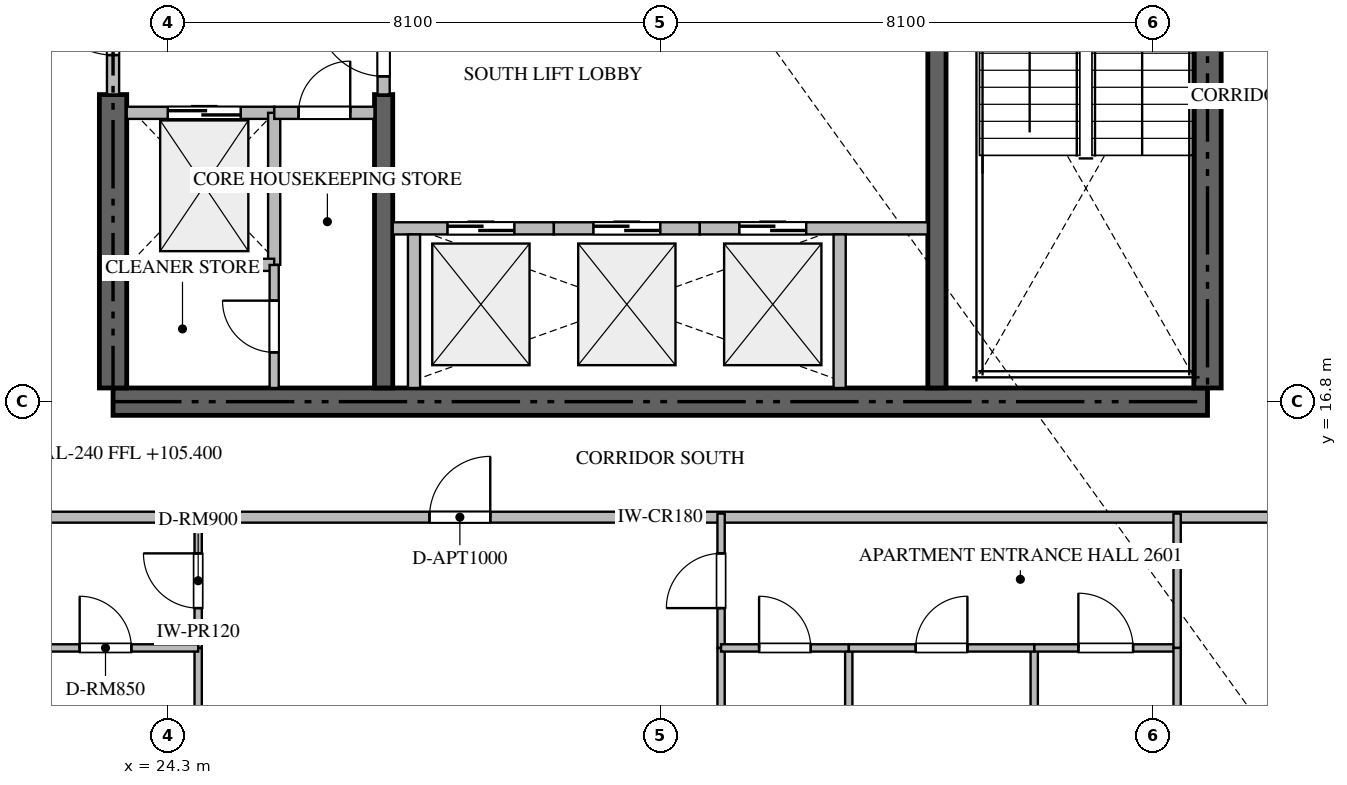
"""IFC4 building model, lengths in metres.
Left out: names, types, materials, properties, quantities, classifications, styles, units other than length and angle.
Written with IfcOpenShell. Run it as: python <this file> out.ifc"""

import sys

from ifc_helpers import new_model, si_unit, direction, frame, frame_2d, origin, place, context, subcontext, project, spatial, rectangle, extrude, source, transform, mapped, element, fill, save


model = new_model("IFC4")
c1 = context("Model", 3, precision=1e-05, world=origin(), true_north=direction((0.0, 1.0)))
c2 = subcontext(c1, "Body", "Model", "MODEL_VIEW")
j1 = project(units=[si_unit("LENGTHUNIT", "METRE"), si_unit("PLANEANGLEUNIT", "RADIAN")], contexts=[c1])
p1 = place(None, origin())
s1 = spatial("IfcSite", under=j1, at=p1, CompositionType="ELEMENT")
p2 = place(p1, origin())
s2 = spatial("IfcBuilding", under=s1, at=p2, CompositionType="ELEMENT")
p3 = place(p2, frame((0.0, 0.0, 105.45)))
s3 = spatial("IfcBuildingStorey", under=s2, at=p3, CompositionType="ELEMENT", Elevation=105.45)
p4 = place(p3, frame((23.4, 16.8, -0.26), z_axis=(0.0, 0.0, 1.0), x_axis=(1.0, 0.0, 0.0)))
e1 = element("IfcWall", 1, at=p4, inside=s3, PredefinedType="SHEAR", context=c2, shape_type="SweptSolid", body=[
    extrude(rectangle(XDim=18.0, YDim=0.45, at=frame_2d((9.0, 0.0))), origin(), (0.0, 0.0, 1.0), 3.648),
])
p5 = place(p3, frame((23.4, 17.025, -0.26), z_axis=(0.0, 0.0, 1.0), x_axis=(0.0, 1.0, 0.0)))
e2 = element("IfcWall", 2, at=p5, inside=s3, PredefinedType="SHEAR", context=c2, shape_type="SweptSolid", body=[
    extrude(rectangle(XDim=4.825, YDim=0.45, at=frame_2d((2.413, 0.0))), origin(), (0.0, 0.0, 1.0), 3.648),
])
p6 = place(p3, frame((41.4, 17.025, -0.26), z_axis=(0.0, 0.0, 1.0), x_axis=(0.0, 1.0, 0.0)))
e3 = element("IfcWall", 3, at=p6, inside=s3, PredefinedType="SHEAR", context=c2, shape_type="SweptSolid", body=[
    extrude(rectangle(XDim=8.325, YDim=0.45, at=frame_2d((4.163, 0.0))), origin(), (0.0, 0.0, 1.0), 3.648),
])
p7 = place(p3, frame((27.85, 17.025, -0.26), z_axis=(0.0, 0.0, 1.0), x_axis=(0.0, 1.0, 0.0)))
e4 = element("IfcWall", 4, at=p7, inside=s3, PredefinedType="SHEAR", context=c2, shape_type="SweptSolid", body=[
    extrude(rectangle(XDim=4.825, YDim=0.3, at=frame_2d((2.413, 0.0))), origin(), (0.0, 0.0, 1.0), 3.648),
])
p8 = place(p3, frame((36.95, 17.025, -0.26), z_axis=(0.0, 0.0, 1.0), x_axis=(0.0, 1.0, 0.0)))
e5 = element("IfcWall", 5, at=p8, inside=s3, PredefinedType="SHEAR", context=c2, shape_type="SweptSolid", body=[
    extrude(rectangle(XDim=8.325, YDim=0.3, at=frame_2d((4.163, 0.0))), origin(), (0.0, 0.0, 1.0), 3.648),
])
p9 = place(p3, frame((23.625, 21.55, 0.0), z_axis=(0.0, 0.0, 1.0), x_axis=(1.0, 0.0, 0.0)))
e6 = element("IfcWall", 6, at=p9, inside=s3, PredefinedType="STANDARD", context=c2, shape_type="SweptSolid", body=[
    extrude(rectangle(XDim=2.425, YDim=0.2, at=frame_2d((1.212, 0.0))), origin(), (0.0, 0.0, 1.0), 3.39),
])
p10 = place(p9, frame((0.675, 0.0, 0.0)))
e7 = element("IfcOpeningElement", 7, at=p10, cuts=e6, PredefinedType="OPENING", context=c2, shape_type="SweptSolid", body=[
    extrude(rectangle(XDim=1.2, YDim=2.2, at=frame_2d((0.6, 1.1))), frame((0.0, 0.11, 0.0), z_axis=(0.0, -1.0, 0.0), x_axis=(1.0, 0.0, 0.0)), (0.0, 0.0, 1.0), 0.22),
])
p11 = place(p3, frame((28.0, 19.65, 0.0), z_axis=(0.0, 0.0, 1.0), x_axis=(1.0, 0.0, 0.0)))
e8 = element("IfcWall", 8, at=p11, inside=s3, PredefinedType="STANDARD", context=c2, shape_type="SweptSolid", body=[
    extrude(rectangle(XDim=2.65, YDim=0.2, at=frame_2d((1.325, 0.0))), origin(), (0.0, 0.0, 1.0), 3.39),
])
p12 = place(p11, frame((0.9, 0.0, 0.0)))
e9 = element("IfcOpeningElement", 9, at=p12, cuts=e8, PredefinedType="OPENING", context=c2, shape_type="SweptSolid", body=[
    extrude(rectangle(XDim=1.1, YDim=2.2, at=frame_2d((0.55, 1.1))), frame((0.0, 0.11, 0.0), z_axis=(0.0, -1.0, 0.0), x_axis=(1.0, 0.0, 0.0)), (0.0, 0.0, 1.0), 0.22),
])
p13 = place(p3, frame((28.35, 17.025, 0.0), z_axis=(0.0, 0.0, 1.0), x_axis=(0.0, 1.0, 0.0)))
e10 = element("IfcWall", 10, at=p13, inside=s3, PredefinedType="STANDARD", context=c2, shape_type="SweptSolid", body=[
    extrude(rectangle(XDim=2.525, YDim=0.2, at=frame_2d((1.263, 0.0))), origin(), (0.0, 0.0, 1.0), 3.39),
])
p14 = place(p3, frame((30.65, 19.65, 0.0), z_axis=(0.0, 0.0, 1.0), x_axis=(1.0, 0.0, 0.0)))
e11 = element("IfcWall", 11, at=p14, inside=s3, PredefinedType="STANDARD", context=c2, shape_type="SweptSolid", body=[
    extrude(rectangle(XDim=2.4, YDim=0.2, at=frame_2d((1.2, 0.0))), origin(), (0.0, 0.0, 1.0), 3.39),
])
p15 = place(p14, frame((0.65, 0.0, 0.0)))
e12 = element("IfcOpeningElement", 12, at=p15, cuts=e11, PredefinedType="OPENING", context=c2, shape_type="SweptSolid", body=[
    extrude(rectangle(XDim=1.1, YDim=2.2, at=frame_2d((0.55, 1.1))), frame((0.0, 0.11, 0.0), z_axis=(0.0, -1.0, 0.0), x_axis=(1.0, 0.0, 0.0)), (0.0, 0.0, 1.0), 0.22),
])
p16 = place(p3, frame((33.05, 19.65, 0.0), z_axis=(0.0, 0.0, 1.0), x_axis=(1.0, 0.0, 0.0)))
e13 = element("IfcWall", 13, at=p16, inside=s3, PredefinedType="STANDARD", context=c2, shape_type="SweptSolid", body=[
    extrude(rectangle(XDim=3.75, YDim=0.2, at=frame_2d((1.875, 0.0))), origin(), (0.0, 0.0, 1.0), 3.39),
])
p17 = place(p16, frame((0.65, 0.0, 0.0)))
e14 = element("IfcOpeningElement", 14, at=p17, cuts=e13, PredefinedType="OPENING", context=c2, shape_type="SweptSolid", body=[
    extrude(rectangle(XDim=1.1, YDim=2.2, at=frame_2d((0.55, 1.1))), frame((0.0, 0.11, 0.0), z_axis=(0.0, -1.0, 0.0), x_axis=(1.0, 0.0, 0.0)), (0.0, 0.0, 1.0), 0.22),
])
p18 = place(p3, frame((35.35, 17.025, 0.0), z_axis=(0.0, 0.0, 1.0), x_axis=(0.0, 1.0, 0.0)))
e15 = element("IfcWall", 15, at=p18, inside=s3, PredefinedType="STANDARD", context=c2, shape_type="SweptSolid", body=[
    extrude(rectangle(XDim=2.525, YDim=0.2, at=frame_2d((1.263, 0.0))), origin(), (0.0, 0.0, 1.0), 3.39),
])
p19 = place(p3, frame((26.05, 19.05, 0.0), z_axis=(0.0, 0.0, 1.0), x_axis=(0.0, 1.0, 0.0)))
e16 = element("IfcWall", 16, at=p19, inside=s3, PredefinedType="STANDARD", context=c2, shape_type="SweptSolid", body=[
    extrude(rectangle(XDim=2.5, YDim=0.2, at=frame_2d((1.25, 0.0))), origin(), (0.0, 0.0, 1.0), 3.39),
])
p20 = place(p3, frame((23.625, 19.05, 0.0), z_axis=(0.0, 0.0, 1.0), x_axis=(1.0, 0.0, 0.0)))
e17 = element("IfcWall", 17, at=p20, inside=s3, PredefinedType="STANDARD", context=c2, shape_type="SweptSolid", body=[
    extrude(rectangle(XDim=2.425, YDim=0.2, at=frame_2d((1.212, 0.0))), origin(), (0.0, 0.0, 1.0), 3.39),
])
p21 = place(p3, frame((26.052, 21.55, 0.0), z_axis=(0.0, 0.0, 1.0), x_axis=(1.0, 0.0, 0.0)))
e18 = element("IfcWall", 18, at=p21, inside=s3, PredefinedType="STANDARD", context=c2, shape_type="SweptSolid", body=[
    extrude(rectangle(XDim=1.648, YDim=0.2, at=frame_2d((0.824, 0.0))), origin(), (0.0, 0.0, 1.0), 3.39),
])
p22 = place(p21, frame((0.399, 0.0, 0.0)))
e19 = element("IfcOpeningElement", 19, at=p22, cuts=e18, PredefinedType="OPENING", context=c2, shape_type="SweptSolid", body=[
    extrude(rectangle(XDim=0.85, YDim=2.1, at=frame_2d((0.425, 1.05))), frame((0.0, 0.11, 0.0), z_axis=(0.0, -1.0, 0.0), x_axis=(1.0, 0.0, 0.0)), (0.0, 0.0, 1.0), 0.22),
])
p23 = place(p3, frame((23.4, 21.852, 0.0), z_axis=(0.0, 0.0, 1.0), x_axis=(0.0, 1.0, 0.0)))
e20 = element("IfcWall", 20, at=p23, inside=s3, PredefinedType="STANDARD", context=c2, shape_type="SweptSolid", body=[
    extrude(rectangle(XDim=2.396, YDim=0.2, at=frame_2d((1.198, 0.0))), origin(), (0.0, 0.0, 1.0), 3.39),
])
p24 = place(p23, frame((0.648, 0.0, 0.0)))
e21 = element("IfcOpeningElement", 21, at=p24, cuts=e20, PredefinedType="OPENING", context=c2, shape_type="SweptSolid", body=[
    extrude(rectangle(XDim=1.1, YDim=2.15, at=frame_2d((0.55, 1.075))), frame((0.0, 0.11, 0.0), z_axis=(0.0, -1.0, 0.0), x_axis=(1.0, 0.0, 0.0)), (0.0, 0.0, 1.0), 0.22),
])
p25 = place(p3, frame((27.85, 21.852, 0.0), z_axis=(0.0, 0.0, 1.0), x_axis=(0.0, 1.0, 0.0)))
e22 = element("IfcWall", 22, at=p25, inside=s3, PredefinedType="STANDARD", context=c2, shape_type="SweptSolid", body=[
    extrude(rectangle(XDim=1.696, YDim=0.2, at=frame_2d((0.848, 0.0))), origin(), (0.0, 0.0, 1.0), 3.39),
])
p26 = place(p25, frame((0.298, 0.0, 0.0)))
e23 = element("IfcOpeningElement", 23, at=p26, cuts=e22, PredefinedType="OPENING", context=c2, shape_type="SweptSolid", body=[
    extrude(rectangle(XDim=1.1, YDim=2.15, at=frame_2d((0.55, 1.075))), frame((0.0, 0.11, 0.0), z_axis=(0.0, -1.0, 0.0), x_axis=(1.0, 0.0, 0.0)), (0.0, 0.0, 1.0), 0.22),
])
p27 = place(p3, frame((26.05, 17.025, 0.0), z_axis=(0.0, 0.0, 1.0), x_axis=(0.0, 1.0, 0.0)))
e24 = element("IfcWall", 24, at=p27, inside=s3, PredefinedType="PARTITIONING", context=c2, shape_type="SweptSolid", body=[
    extrude(rectangle(XDim=2.023, YDim=0.15, at=frame_2d((1.012, 0.0))), origin(), (0.0, 0.0, 1.0), 3.39),
])
p28 = place(p27, frame((0.586, 0.0, 0.0)))
e25 = element("IfcOpeningElement", 25, at=p28, cuts=e24, PredefinedType="OPENING", context=c2, shape_type="SweptSolid", body=[
    extrude(rectangle(XDim=0.85, YDim=2.1, at=frame_2d((0.425, 1.05))), frame((0.0, 0.085, 0.0), z_axis=(0.0, -1.0, 0.0), x_axis=(1.0, 0.0, 0.0)), (0.0, 0.0, 1.0), 0.17),
])
p29 = place(p3, frame((21.402, 14.9, 0.0), z_axis=(0.0, 0.0, 1.0), x_axis=(1.0, 0.0, 0.0)))
e26 = element("IfcWall", 26, at=p29, inside=s3, PredefinedType="PARTITIONING", context=c2, shape_type="SweptSolid", body=[
    extrude(rectangle(XDim=21.996, YDim=0.18, at=frame_2d((10.998, 0.0))), origin(), (0.0, 0.0, 1.0), 3.39),
])
p30 = place(p29, frame((7.202, 0.0, 0.0)))
e27 = element("IfcOpeningElement", 27, at=p30, cuts=e26, PredefinedType="OPENING", context=c2, shape_type="SweptSolid", body=[
    extrude(rectangle(XDim=1.0, YDim=2.15, at=frame_2d((0.5, 1.075))), frame((0.0, 0.1, 0.0), z_axis=(0.0, -1.0, 0.0), x_axis=(1.0, 0.0, 0.0)), (0.0, 0.0, 1.0), 0.2),
])
p31 = place(p3, frame((24.8, 12.75, 0.0), z_axis=(0.0, 0.0, 1.0), x_axis=(0.0, 1.0, 0.0)))
e28 = element("IfcWall", 28, at=p31, inside=s3, PredefinedType="PARTITIONING", context=c2, shape_type="SweptSolid", body=[
    extrude(rectangle(XDim=2.21, YDim=0.12, at=frame_2d((1.105, 0.0))), origin(), (0.0, 0.0, 1.0), 3.39),
])
p32 = place(p31, frame((0.655, 0.0, 0.0)))
e29 = element("IfcOpeningElement", 29, at=p32, cuts=e28, PredefinedType="OPENING", context=c2, shape_type="SweptSolid", body=[
    extrude(rectangle(XDim=0.9, YDim=2.1, at=frame_2d((0.45, 1.05))), frame((0.0, 0.07, 0.0), z_axis=(0.0, -1.0, 0.0), x_axis=(1.0, 0.0, 0.0)), (0.0, 0.0, 1.0), 0.14),
])
p33 = place(p3, frame((24.8, 6.862, 0.0), z_axis=(0.0, 0.0, 1.0), x_axis=(0.0, 1.0, 0.0)))
e30 = element("IfcWall", 30, at=p33, inside=s3, PredefinedType="PARTITIONING", context=c2, shape_type="SweptSolid", body=[
    extrude(rectangle(XDim=5.886, YDim=0.12, at=frame_2d((2.943, 0.0))), origin(), (0.0, 0.0, 1.0), 3.39),
])
p34 = place(p3, frame((21.752, 12.75, 0.0), z_axis=(0.0, 0.0, 1.0), x_axis=(1.0, 0.0, 0.0)))
e31 = element("IfcWall", 31, at=p34, inside=s3, PredefinedType="PARTITIONING", context=c2, shape_type="SweptSolid", body=[
    extrude(rectangle(XDim=3.048, YDim=0.12, at=frame_2d((1.524, 0.0))), origin(), (0.0, 0.0, 1.0), 3.39),
])
p35 = place(p34, frame((1.099, 0.0, 0.0)))
e32 = element("IfcOpeningElement", 32, at=p35, cuts=e31, PredefinedType="OPENING", context=c2, shape_type="SweptSolid", body=[
    extrude(rectangle(XDim=0.85, YDim=2.1, at=frame_2d((0.425, 1.05))), frame((0.0, 0.07, 0.0), z_axis=(0.0, -1.0, 0.0), x_axis=(1.0, 0.0, 0.0)), (0.0, 0.0, 1.0), 0.14),
])
p36 = place(p3, frame((33.4, 12.75, 0.0), z_axis=(0.0, 0.0, 1.0), x_axis=(0.0, 1.0, 0.0)))
e33 = element("IfcWall", 33, at=p36, inside=s3, PredefinedType="PARTITIONING", context=c2, shape_type="SweptSolid", body=[
    extrude(rectangle(XDim=2.21, YDim=0.12, at=frame_2d((1.105, 0.0))), origin(), (0.0, 0.0, 1.0), 3.39),
])
p37 = place(p36, frame((0.655, 0.0, 0.0)))
e34 = element("IfcOpeningElement", 34, at=p37, cuts=e33, PredefinedType="OPENING", context=c2, shape_type="SweptSolid", body=[
    extrude(rectangle(XDim=0.9, YDim=2.1, at=frame_2d((0.45, 1.05))), frame((0.0, 0.07, 0.0), z_axis=(0.0, -1.0, 0.0), x_axis=(1.0, 0.0, 0.0)), (0.0, 0.0, 1.0), 0.14),
])
p38 = place(p3, frame((33.4, 6.862, 0.0), z_axis=(0.0, 0.0, 1.0), x_axis=(0.0, 1.0, 0.0)))
e35 = element("IfcWall", 35, at=p38, inside=s3, PredefinedType="PARTITIONING", context=c2, shape_type="SweptSolid", body=[
    extrude(rectangle(XDim=5.886, YDim=0.12, at=frame_2d((2.943, 0.0))), origin(), (0.0, 0.0, 1.0), 3.39),
])
p39 = place(p3, frame((38.55, 0.295, 0.0), z_axis=(0.0, 0.0, 1.0), x_axis=(0.0, 1.0, 0.0)))
e36 = element("IfcWall", 36, at=p39, inside=s3, PredefinedType="PARTITIONING", context=c2, shape_type="SweptSolid", body=[
    extrude(rectangle(XDim=12.455, YDim=0.12, at=frame_2d((6.228, 0.0))), origin(), (0.0, 0.0, 1.0), 3.39),
])
p40 = place(p3, frame((35.5, 6.86, 0.0), z_axis=(0.0, 0.0, 1.0), x_axis=(0.0, 1.0, 0.0)))
e37 = element("IfcWall", 37, at=p40, inside=s3, PredefinedType="PARTITIONING", context=c2, shape_type="SweptSolid", body=[
    extrude(rectangle(XDim=5.89, YDim=0.12, at=frame_2d((2.945, 0.0))), origin(), (0.0, 0.0, 1.0), 3.39),
])
p41 = place(p3, frame((33.4, 12.75, 0.0), z_axis=(0.0, 0.0, 1.0), x_axis=(1.0, 0.0, 0.0)))
e38 = element("IfcWall", 38, at=p41, inside=s3, PredefinedType="PARTITIONING", context=c2, shape_type="SweptSolid", body=[
    extrude(rectangle(XDim=2.1, YDim=0.12, at=frame_2d((1.05, 0.0))), origin(), (0.0, 0.0, 1.0), 3.39),
])
p42 = place(p41, frame((0.625, 0.0, 0.0)))
e39 = element("IfcOpeningElement", 39, at=p42, cuts=e38, PredefinedType="OPENING", context=c2, shape_type="SweptSolid", body=[
    extrude(rectangle(XDim=0.85, YDim=2.1, at=frame_2d((0.425, 1.05))), frame((0.0, 0.07, 0.0), z_axis=(0.0, -1.0, 0.0), x_axis=(1.0, 0.0, 0.0)), (0.0, 0.0, 1.0), 0.14),
])
p43 = place(p3, frame((35.502, 12.75, 0.0), z_axis=(0.0, 0.0, 1.0), x_axis=(1.0, 0.0, 0.0)))
e40 = element("IfcWall", 40, at=p43, inside=s3, PredefinedType="PARTITIONING", context=c2, shape_type="SweptSolid", body=[
    extrude(rectangle(XDim=3.048, YDim=0.12, at=frame_2d((1.524, 0.0))), origin(), (0.0, 0.0, 1.0), 3.39),
])
p44 = place(p43, frame((1.099, 0.0, 0.0)))
e41 = element("IfcOpeningElement", 41, at=p44, cuts=e40, PredefinedType="OPENING", context=c2, shape_type="SweptSolid", body=[
    extrude(rectangle(XDim=0.85, YDim=2.1, at=frame_2d((0.425, 1.05))), frame((0.0, 0.07, 0.0), z_axis=(0.0, -1.0, 0.0), x_axis=(1.0, 0.0, 0.0)), (0.0, 0.0, 1.0), 0.14),
])
p45 = place(p3, frame((38.552, 12.75, 0.0), z_axis=(0.0, 0.0, 1.0), x_axis=(1.0, 0.0, 0.0)))
e42 = element("IfcWall", 42, at=p45, inside=s3, PredefinedType="PARTITIONING", context=c2, shape_type="SweptSolid", body=[
    extrude(rectangle(XDim=2.348, YDim=0.12, at=frame_2d((1.174, 0.0))), origin(), (0.0, 0.0, 1.0), 3.39),
])
p46 = place(p45, frame((0.724, 0.0, 0.0)))
e43 = element("IfcOpeningElement", 43, at=p46, cuts=e42, PredefinedType="OPENING", context=c2, shape_type="SweptSolid", body=[
    extrude(rectangle(XDim=0.9, YDim=2.1, at=frame_2d((0.45, 1.05))), frame((0.0, 0.07, 0.0), z_axis=(0.0, -1.0, 0.0), x_axis=(1.0, 0.0, 0.0)), (0.0, 0.0, 1.0), 0.14),
])
p47 = place(p3, frame((40.9, 9.095, 0.0), z_axis=(0.0, 0.0, 1.0), x_axis=(0.0, 1.0, 0.0)))
e44 = element("IfcWall", 44, at=p47, inside=s3, PredefinedType="PARTITIONING", context=c2, shape_type="SweptSolid", body=[
    extrude(rectangle(XDim=3.655, YDim=0.12, at=frame_2d((1.828, 0.0))), origin(), (0.0, 0.0, 1.0), 3.39),
])
p48 = place(p47, frame((1.402, 0.0, 0.0)))
e45 = element("IfcOpeningElement", 45, at=p48, cuts=e44, PredefinedType="OPENING", context=c2, shape_type="SweptSolid", body=[
    extrude(rectangle(XDim=0.85, YDim=2.1, at=frame_2d((0.425, 1.05))), frame((0.0, 0.07, 0.0), z_axis=(0.0, -1.0, 0.0), x_axis=(1.0, 0.0, 0.0)), (0.0, 0.0, 1.0), 0.14),
])
p49 = place(p3, frame((40.9, 12.752, 0.0), z_axis=(0.0, 0.0, 1.0), x_axis=(0.0, 1.0, 0.0)))
e46 = element("IfcWall", 46, at=p49, inside=s3, PredefinedType="PARTITIONING", context=c2, shape_type="SweptSolid", body=[
    extrude(rectangle(XDim=2.208, YDim=0.12, at=frame_2d((1.104, 0.0))), origin(), (0.0, 0.0, 1.0), 3.39),
])
m1 = source(origin(), c2, "Body", "SweptSolid", [
    extrude(rectangle(XDim=1.2, YDim=2.2, at=frame_2d((0.6, 1.1))), frame((0.0, 0.025, 0.0), z_axis=(0.0, -1.0, 0.0), x_axis=(1.0, 0.0, 0.0)), (0.0, 0.0, 1.0), 0.05),
])
p50 = place(p10, origin())
e47 = element("IfcDoor", 47, at=p50, inside=s3, OperationType="DOUBLE_DOOR_SLIDING", PredefinedType="DOOR", context=c2, shape_type="MappedRepresentation", body=[
    mapped(m1, transform((0.0, 0.0, 0.0), scale=1.0)),
])
fill(e7, e47)
m2 = source(origin(), c2, "Body", "SweptSolid", [
    extrude(rectangle(XDim=1.1, YDim=2.2, at=frame_2d((0.55, 1.1))), frame((0.0, 0.025, 0.0), z_axis=(0.0, -1.0, 0.0), x_axis=(1.0, 0.0, 0.0)), (0.0, 0.0, 1.0), 0.05),
])
p51 = place(p12, origin())
e48 = element("IfcDoor", 48, at=p51, inside=s3, OperationType="DOUBLE_DOOR_SLIDING", PredefinedType="DOOR", context=c2, shape_type="MappedRepresentation", body=[
    mapped(m2, transform((0.0, 0.0, 0.0), scale=1.0)),
])
fill(e9, e48)
p52 = place(p15, origin())
e49 = element("IfcDoor", 49, at=p52, inside=s3, OperationType="DOUBLE_DOOR_SLIDING", PredefinedType="DOOR", context=c2, shape_type="MappedRepresentation", body=[
    mapped(m2, transform((0.0, 0.0, 0.0), scale=1.0)),
])
fill(e12, e49)
p53 = place(p17, origin())
e50 = element("IfcDoor", 50, at=p53, inside=s3, OperationType="DOUBLE_DOOR_SLIDING", PredefinedType="DOOR", context=c2, shape_type="MappedRepresentation", body=[
    mapped(m2, transform((0.0, 0.0, 0.0), scale=1.0)),
])
fill(e14, e50)
m3 = source(origin(), c2, "Body", "SweptSolid", [
    extrude(rectangle(XDim=0.85, YDim=2.1, at=frame_2d((0.425, 1.05))), frame((0.0, 0.025, 0.0), z_axis=(0.0, -1.0, 0.0), x_axis=(1.0, 0.0, 0.0)), (0.0, 0.0, 1.0), 0.05),
])
p54 = place(p22, origin())
e51 = element("IfcDoor", 51, at=p54, inside=s3, OperationType="SINGLE_SWING_RIGHT", PredefinedType="DOOR", context=c2, shape_type="MappedRepresentation", body=[
    mapped(m3, transform((0.0, 0.0, 0.0), scale=1.0)),
])
fill(e19, e51)
m4 = source(origin(), c2, "Body", "SweptSolid", [
    extrude(rectangle(XDim=1.1, YDim=2.15, at=frame_2d((0.55, 1.075))), frame((0.0, 0.025, 0.0), z_axis=(0.0, -1.0, 0.0), x_axis=(1.0, 0.0, 0.0)), (0.0, 0.0, 1.0), 0.05),
])
p55 = place(p24, origin())
e52 = element("IfcDoor", 52, at=p55, inside=s3, OperationType="SINGLE_SWING_RIGHT", PredefinedType="DOOR", context=c2, shape_type="MappedRepresentation", body=[
    mapped(m4, transform((0.0, 0.0, 0.0), scale=1.0)),
])
fill(e21, e52)
p56 = place(p26, origin())
e53 = element("IfcDoor", 53, at=p56, inside=s3, OperationType="SINGLE_SWING_RIGHT", PredefinedType="DOOR", context=c2, shape_type="MappedRepresentation", body=[
    mapped(m4, transform((0.0, 0.0, 0.0), scale=1.0)),
])
fill(e23, e53)
p57 = place(p28, origin())
e54 = element("IfcDoor", 54, at=p57, inside=s3, OperationType="SINGLE_SWING_RIGHT", PredefinedType="DOOR", context=c2, shape_type="MappedRepresentation", body=[
    mapped(m3, transform((0.0, 0.0, 0.0), scale=1.0)),
])
fill(e25, e54)
m5 = source(origin(), c2, "Body", "SweptSolid", [
    extrude(rectangle(XDim=1.0, YDim=2.15, at=frame_2d((0.5, 1.075))), frame((0.0, 0.025, 0.0), z_axis=(0.0, -1.0, 0.0), x_axis=(1.0, 0.0, 0.0)), (0.0, 0.0, 1.0), 0.05),
])
p58 = place(p30, origin())
e55 = element("IfcDoor", 55, at=p58, inside=s3, OperationType="SINGLE_SWING_RIGHT", PredefinedType="DOOR", context=c2, shape_type="MappedRepresentation", body=[
    mapped(m5, transform((0.0, 0.0, 0.0), scale=1.0)),
])
fill(e27, e55)
m6 = source(origin(), c2, "Body", "SweptSolid", [
    extrude(rectangle(XDim=0.9, YDim=2.1, at=frame_2d((0.45, 1.05))), frame((0.0, 0.025, 0.0), z_axis=(0.0, -1.0, 0.0), x_axis=(1.0, 0.0, 0.0)), (0.0, 0.0, 1.0), 0.05),
])
p59 = place(p32, origin())
e56 = element("IfcDoor", 56, at=p59, inside=s3, OperationType="SINGLE_SWING_RIGHT", PredefinedType="DOOR", context=c2, shape_type="MappedRepresentation", body=[
    mapped(m6, transform((0.0, 0.0, 0.0), scale=1.0)),
])
fill(e29, e56)
p60 = place(p35, origin())
e57 = element("IfcDoor", 57, at=p60, inside=s3, OperationType="SINGLE_SWING_LEFT", PredefinedType="DOOR", context=c2, shape_type="MappedRepresentation", body=[
    mapped(m3, transform((0.0, 0.0, 0.0), scale=1.0)),
])
fill(e32, e57)
p61 = place(p37, origin())
e58 = element("IfcDoor", 58, at=p61, inside=s3, OperationType="SINGLE_SWING_LEFT", PredefinedType="DOOR", context=c2, shape_type="MappedRepresentation", body=[
    mapped(m6, transform((0.0, 0.0, 0.0), scale=1.0)),
])
fill(e34, e58)
p62 = place(p42, origin())
e59 = element("IfcDoor", 59, at=p62, inside=s3, OperationType="SINGLE_SWING_LEFT", PredefinedType="DOOR", context=c2, shape_type="MappedRepresentation", body=[
    mapped(m3, transform((0.0, 0.0, 0.0), scale=1.0)),
])
fill(e39, e59)
p63 = place(p44, origin())
e60 = element("IfcDoor", 60, at=p63, inside=s3, OperationType="SINGLE_SWING_RIGHT", PredefinedType="DOOR", context=c2, shape_type="MappedRepresentation", body=[
    mapped(m3, transform((0.0, 0.0, 0.0), scale=1.0)),
])
fill(e41, e60)
p64 = place(p46, origin())
e61 = element("IfcDoor", 61, at=p64, inside=s3, OperationType="SINGLE_SWING_LEFT", PredefinedType="DOOR", context=c2, shape_type="MappedRepresentation", body=[
    mapped(m6, transform((0.0, 0.0, 0.0), scale=1.0)),
])
fill(e43, e61)
save(model, sys.argv[1])
